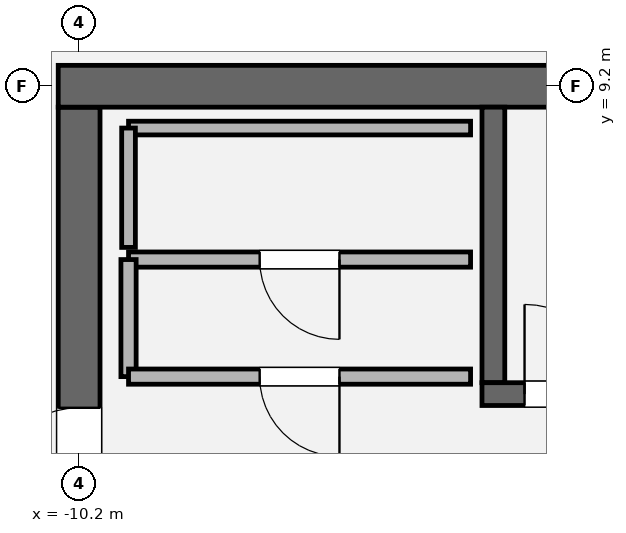
"""IFC4 building model, lengths in metres.
Left out: names, types, materials, properties, quantities, classifications, styles, units other than length and angle.
Written with IfcOpenShell. Run it as: python <this file> out.ifc"""

import sys

from ifc_helpers import new_model, si_unit, direction, frame, frame_2d, origin, place, context, subcontext, project, spatial, rectangle, extrude, element, fill, save


model = new_model("IFC4")
c1 = context("Model", 3, precision=1e-05, world=origin(), true_north=direction((0.0, 1.0)))
c2 = subcontext(c1, "Body", "Model", "MODEL_VIEW")
j1 = project(units=[si_unit("LENGTHUNIT", "METRE"), si_unit("PLANEANGLEUNIT", "RADIAN")], contexts=[c1])
p1 = place(None, origin())
s1 = spatial("IfcSite", under=j1, at=p1, CompositionType="ELEMENT")
p2 = place(p1, origin())
s2 = spatial("IfcBuilding", under=s1, at=p2, CompositionType="ELEMENT")
p3 = place(p2, frame((0.0, 0.0, 251.4)))
s3 = spatial("IfcBuildingStorey", under=s2, at=p3, CompositionType="ELEMENT", Elevation=251.4)
p4 = place(p3, frame((-10.2, -8.925, 0.0), z_axis=(0.0, 0.0, 1.0), x_axis=(0.0, 1.0, 0.0)))
e1 = element("IfcWall", 1, at=p4, inside=s3, PredefinedType="SHEAR", context=c2, shape_type="SweptSolid", body=[
    extrude(rectangle(XDim=17.85, YDim=0.55, at=frame_2d((8.925, 0.0))), origin(), (0.0, 0.0, 1.0), 4.05),
])
p5 = place(p4, frame((12.715, 0.0, 0.0)))
e2 = element("IfcOpeningElement", 2, at=p5, cuts=e1, PredefinedType="OPENING", context=c2, shape_type="SweptSolid", body=[
    extrude(rectangle(XDim=1.18, YDim=2.2, at=frame_2d((0.59, 1.1))), frame((0.0, 0.285, 0.0), z_axis=(0.0, -1.0, 0.0), x_axis=(1.0, 0.0, 0.0)), (0.0, 0.0, 1.0), 0.57),
])
p6 = place(p3, frame((-10.475, 9.2, 0.0), z_axis=(0.0, 0.0, 1.0), x_axis=(1.0, 0.0, 0.0)))
e3 = element("IfcWall", 3, at=p6, inside=s3, PredefinedType="SHEAR", context=c2, shape_type="SweptSolid", body=[
    extrude(rectangle(XDim=20.95, YDim=0.55, at=frame_2d((10.475, 0.0))), origin(), (0.0, 0.0, 1.0), 4.05),
])
p7 = place(p3, frame((-4.75, 5.3, 0.0), z_axis=(0.0, 0.0, 1.0), x_axis=(0.0, 1.0, 0.0)))
e4 = element("IfcWall", 4, at=p7, inside=s3, PredefinedType="SOLIDWALL", context=c2, shape_type="SweptSolid", body=[
    extrude(rectangle(XDim=3.625, YDim=0.3, at=frame_2d((1.812, 0.0))), origin(), (0.0, 0.0, 1.0), 4.05),
])
p8 = place(p3, frame((-4.9, 5.15, 0.0), z_axis=(0.0, 0.0, 1.0), x_axis=(1.0, 0.0, 0.0)))
e5 = element("IfcWall", 5, at=p8, inside=s3, PredefinedType="SOLIDWALL", context=c2, shape_type="SweptSolid", body=[
    extrude(rectangle(XDim=9.8, YDim=0.3, at=frame_2d((4.9, 0.0))), origin(), (0.0, 0.0, 1.0), 4.05),
])
p9 = place(p8, frame((0.56, 0.0, 0.0)))
e6 = element("IfcOpeningElement", 6, at=p9, cuts=e5, PredefinedType="OPENING", context=c2, shape_type="SweptSolid", body=[
    extrude(rectangle(XDim=1.18, YDim=2.2, at=frame_2d((0.59, 1.1))), frame((0.0, 0.16, 0.0), z_axis=(0.0, -1.0, 0.0), x_axis=(1.0, 0.0, 0.0)), (0.0, 0.0, 1.0), 0.32),
])
p10 = place(p3, frame((-5.05, 6.92, 0.0), z_axis=(0.0, 0.0, 1.0), x_axis=(-1.0, 0.0, 0.0)))
e7 = element("IfcWall", 7, at=p10, inside=s3, PredefinedType="SOLIDWALL", context=c2, shape_type="SweptSolid", body=[
    extrude(rectangle(XDim=4.5, YDim=0.2, at=frame_2d((2.25, 0.0))), origin(), (0.0, 0.0, 1.0), 3.85),
])
p11 = place(p10, frame((1.725, 0.0, 0.0)))
e8 = element("IfcOpeningElement", 8, at=p11, cuts=e7, PredefinedType="OPENING", context=c2, shape_type="SweptSolid", body=[
    extrude(rectangle(XDim=1.05, YDim=2.2, at=frame_2d((0.525, 1.1))), frame((0.0, 0.11, 0.0), z_axis=(0.0, -1.0, 0.0), x_axis=(1.0, 0.0, 0.0)), (0.0, 0.0, 1.0), 0.22),
])
p12 = place(p3, frame((-9.55, 6.92, 0.0), z_axis=(0.0, 0.0, 1.0), x_axis=(0.0, -1.0, 0.0)))
e9 = element("IfcWall", 9, at=p12, inside=s3, PredefinedType="SOLIDWALL", context=c2, shape_type="SweptSolid", body=[
    extrude(rectangle(XDim=1.54, YDim=0.2, at=frame_2d((0.77, 0.0))), origin(), (0.0, 0.0, 1.0), 3.85),
])
p13 = place(p3, frame((-9.55, 5.38, 0.0), z_axis=(0.0, 0.0, 1.0), x_axis=(1.0, 0.0, 0.0)))
e10 = element("IfcWall", 10, at=p13, inside=s3, PredefinedType="SOLIDWALL", context=c2, shape_type="SweptSolid", body=[
    extrude(rectangle(XDim=4.5, YDim=0.2, at=frame_2d((2.25, 0.0))), origin(), (0.0, 0.0, 1.0), 3.85),
])
p14 = place(p13, frame((1.725, 0.0, 0.0)))
e11 = element("IfcOpeningElement", 11, at=p14, cuts=e10, PredefinedType="OPENING", context=c2, shape_type="SweptSolid", body=[
    extrude(rectangle(XDim=1.05, YDim=2.2, at=frame_2d((0.525, 1.1))), frame((0.0, 0.11, 0.0), z_axis=(0.0, -1.0, 0.0), x_axis=(1.0, 0.0, 0.0)), (0.0, 0.0, 1.0), 0.22),
])
p15 = place(p3, frame((-5.05, 8.65, 0.0), z_axis=(0.0, 0.0, 1.0), x_axis=(-1.0, 0.0, 0.0)))
e12 = element("IfcWall", 12, at=p15, inside=s3, PredefinedType="PARTITIONING", context=c2, shape_type="SweptSolid", body=[
    extrude(rectangle(XDim=4.5, YDim=0.18, at=frame_2d((2.25, 0.0))), origin(), (0.0, 0.0, 1.0), 3.85),
])
p16 = place(p3, frame((-9.55, 8.65, 0.0), z_axis=(0.0, 0.0, 1.0), x_axis=(0.0, -1.0, 0.0)))
e13 = element("IfcWall", 13, at=p16, inside=s3, PredefinedType="PARTITIONING", context=c2, shape_type="SweptSolid", body=[
    extrude(rectangle(XDim=1.57, YDim=0.18, at=frame_2d((0.785, 0.0))), origin(), (0.0, 0.0, 1.0), 3.85),
])
p17 = place(p9, origin())
e14 = element("IfcDoor", 14, at=p17, inside=s3, OperationType="SINGLE_SWING_LEFT", PredefinedType="DOOR", context=c2, shape_type="SweptSolid", body=[
    extrude(rectangle(XDim=1.18, YDim=2.2, at=frame_2d((0.59, 1.1))), frame((0.0, 0.025, 0.0), z_axis=(0.0, -1.0, 0.0), x_axis=(1.0, 0.0, 0.0)), (0.0, 0.0, 1.0), 0.05),
])
fill(e6, e14)
p18 = place(p5, origin())
e15 = element("IfcDoor", 15, at=p18, inside=s3, OperationType="SINGLE_SWING_LEFT", PredefinedType="DOOR", context=c2, shape_type="SweptSolid", body=[
    extrude(rectangle(XDim=1.18, YDim=2.2, at=frame_2d((0.59, 1.1))), frame((0.0, 0.025, 0.0), z_axis=(0.0, -1.0, 0.0), x_axis=(1.0, 0.0, 0.0)), (0.0, 0.0, 1.0), 0.05),
])
fill(e2, e15)
p19 = place(p14, origin())
e16 = element("IfcDoor", 16, at=p19, inside=s3, OperationType="SINGLE_SWING_RIGHT", PredefinedType="DOOR", context=c2, shape_type="SweptSolid", body=[
    extrude(rectangle(XDim=1.05, YDim=2.2, at=frame_2d((0.525, 1.1))), frame((0.0, 0.025, 0.0), z_axis=(0.0, -1.0, 0.0), x_axis=(1.0, 0.0, 0.0)), (0.0, 0.0, 1.0), 0.05),
])
fill(e11, e16)
p20 = place(p11, origin())
e17 = element("IfcDoor", 17, at=p20, inside=s3, OperationType="SINGLE_SWING_LEFT", PredefinedType="DOOR", context=c2, shape_type="SweptSolid", body=[
    extrude(rectangle(XDim=1.05, YDim=2.2, at=frame_2d((0.525, 1.1))), frame((0.0, 0.025, 0.0), z_axis=(0.0, -1.0, 0.0), x_axis=(1.0, 0.0, 0.0)), (0.0, 0.0, 1.0), 0.05),
])
fill(e8, e17)
save(model, sys.argv[1])
